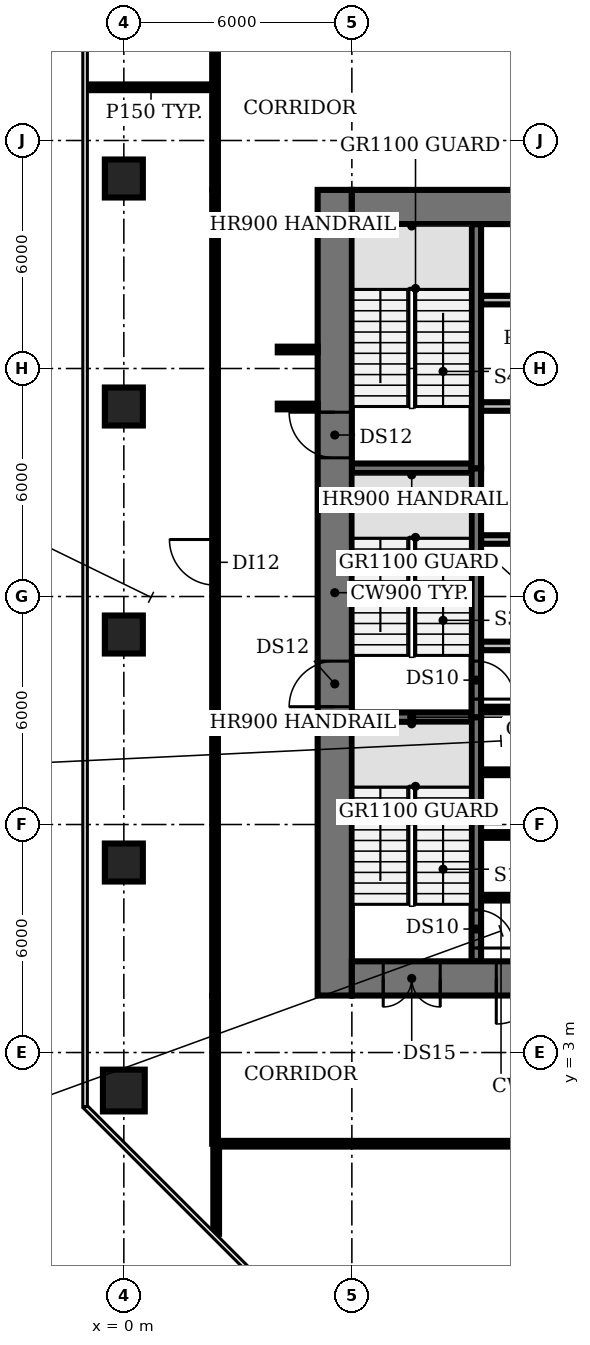
"""IFC4 building model, lengths in metres.
Left out: names, types, materials, properties, quantities, classifications, styles, units other than length and angle.
Written with IfcOpenShell. Run it as: python <this file> out.ifc"""

import sys

from ifc_helpers import new_model, si_unit, direction, frame, frame_2d, origin, origin_2d, place, context, subcontext, project, spatial, rectangle, circle, extrude, element, fill, save


model = new_model("IFC4")
c1 = context("Model", 3, precision=1e-05, world=origin(), true_north=direction((0.0, 1.0)))
c2 = subcontext(c1, "Body", "Model", "MODEL_VIEW")
j1 = project(units=[si_unit("LENGTHUNIT", "METRE"), si_unit("PLANEANGLEUNIT", "RADIAN")], contexts=[c1])
p1 = place(None, origin())
s1 = spatial("IfcSite", under=j1, at=p1, CompositionType="ELEMENT")
p2 = place(p1, origin())
s2 = spatial("IfcBuilding", under=s1, at=p2, CompositionType="ELEMENT")
p3 = place(p2, frame((0.0, 0.0, 24.5)))
s3 = spatial("IfcBuildingStorey", under=s2, at=p3, CompositionType="ELEMENT", Elevation=24.5)
p4 = place(p3, frame((0.0, 2.0, 0.0), z_axis=(0.0, 0.0, 1.0), x_axis=(1.0, 0.0, 0.0)))
e1 = element("IfcColumn", 1, at=p4, inside=s3, PredefinedType="COLUMN", context=c2, shape_type="SweptSolid", body=[
    extrude(circle(Radius=0.55, at=origin_2d()), origin(), (0.0, 0.0, 1.0), 4.15),
])
for number, where, z_axis, x_axis in (
    (2, (0.0, 8.0, 0.0), (0.0, 0.0, 1.0), (1.0, 0.0, 0.0)),
    (3, (0.0, 14.0, 0.0), (0.0, 0.0, 1.0), (1.0, 0.0, 0.0)),
    (4, (0.0, 20.0, 0.0), (0.0, 0.0, 1.0), (1.0, 0.0, 0.0)),
    (5, (0.0, 26.0, 0.0), (0.0, 0.0, 1.0), (1.0, 0.0, 0.0)),
):
    element("IfcColumn", number, at=place(p3, frame(where, z_axis=z_axis, x_axis=x_axis)), inside=s3, PredefinedType="COLUMN", context=c2, shape_type="SweptSolid", body=[
        extrude(rectangle(XDim=1.0, YDim=1.0, at=origin_2d()), origin(), (0.0, 0.0, 1.0), 4.15),
    ])
for number, where, z_axis, x_axis in (
    (6, (9.4, 7.075, 0.0), (0.0, 0.0, 1.0), (1.0, 0.0, 0.0)),
    (7, (9.4, 8.725, 0.0), (0.0, 0.0, 1.0), (1.0, 0.0, 0.0)),
    (8, (9.4, 10.375, 0.0), (0.0, 0.0, 1.0), (1.0, 0.0, 0.0)),
):
    element("IfcWall", number, at=place(p3, frame(where, z_axis=z_axis, x_axis=x_axis)), inside=s3, PredefinedType="SHEAR", context=c2, shape_type="SweptSolid", body=[
        extrude(rectangle(XDim=1.05, YDim=0.15, at=frame_2d((0.525, 0.0))), origin(), (0.0, 0.0, 1.0), 4.15),
    ])
p5 = place(p3, frame((6.0, 11.825, 0.0), z_axis=(0.0, 0.0, 1.0), x_axis=(1.0, 0.0, 0.0)))
e9 = element("IfcWall", 9, at=p5, inside=s3, PredefinedType="SHEAR", context=c2, shape_type="SweptSolid", body=[
    extrude(rectangle(XDim=3.15, YDim=0.25, at=frame_2d((1.575, 0.0))), origin(), (0.0, 0.0, 1.0), 4.15),
])
p6 = place(p3, frame((9.4, 12.025, 0.0), z_axis=(0.0, 0.0, 1.0), x_axis=(1.0, 0.0, 0.0)))
e10 = element("IfcWall", 10, at=p6, inside=s3, PredefinedType="SHEAR", context=c2, shape_type="SweptSolid", body=[
    extrude(rectangle(XDim=1.05, YDim=0.15, at=frame_2d((0.525, 0.0))), origin(), (0.0, 0.0, 1.0), 4.15),
])
p7 = place(p3, frame((9.4, 13.7, 0.0), z_axis=(0.0, 0.0, 1.0), x_axis=(1.0, 0.0, 0.0)))
e11 = element("IfcWall", 11, at=p7, inside=s3, PredefinedType="PARTITIONING", context=c2, shape_type="SweptSolid", body=[
    extrude(rectangle(XDim=4.0, YDim=0.225, at=frame_2d((2.0, 0.0))), origin(), (0.0, 0.0, 1.0), 4.15),
])
p8 = place(p3, frame((9.4, 16.5, 0.0), z_axis=(0.0, 0.0, 1.0), x_axis=(1.0, 0.0, 0.0)))
e12 = element("IfcWall", 12, at=p8, inside=s3, PredefinedType="PARTITIONING", context=c2, shape_type="SweptSolid", body=[
    extrude(rectangle(XDim=14.6, YDim=0.225, at=frame_2d((7.3, 0.0))), origin(), (0.0, 0.0, 1.0), 4.15),
])
p9 = place(p8, frame((0.75, 0.0, 0.0)))
e13 = element("IfcOpeningElement", 13, at=p9, cuts=e12, PredefinedType="OPENING", context=c2, shape_type="SweptSolid", body=[
    extrude(rectangle(XDim=1.1, YDim=2.1, at=frame_2d((0.55, 1.05))), frame((0.0, 0.123, 0.0), z_axis=(0.0, -1.0, 0.0), x_axis=(1.0, 0.0, 0.0)), (0.0, 0.0, 1.0), 0.245),
])
p10 = place(p8, frame((3.55, 0.0, 0.0)))
e14 = element("IfcOpeningElement", 14, at=p10, cuts=e12, PredefinedType="OPENING", context=c2, shape_type="SweptSolid", body=[
    extrude(rectangle(XDim=1.1, YDim=2.1, at=frame_2d((0.55, 1.05))), frame((0.0, 0.123, 0.0), z_axis=(0.0, -1.0, 0.0), x_axis=(1.0, 0.0, 0.0)), (0.0, 0.0, 1.0), 0.245),
])
p11 = place(p8, frame((6.35, 0.0, 0.0)))
e15 = element("IfcOpeningElement", 15, at=p11, cuts=e12, PredefinedType="OPENING", context=c2, shape_type="SweptSolid", body=[
    extrude(rectangle(XDim=1.1, YDim=2.1, at=frame_2d((0.55, 1.05))), frame((0.0, 0.123, 0.0), z_axis=(0.0, -1.0, 0.0), x_axis=(1.0, 0.0, 0.0)), (0.0, 0.0, 1.0), 0.245),
])
p12 = place(p8, frame((9.15, 0.0, 0.0)))
e16 = element("IfcOpeningElement", 16, at=p12, cuts=e12, PredefinedType="OPENING", context=c2, shape_type="SweptSolid", body=[
    extrude(rectangle(XDim=1.1, YDim=2.1, at=frame_2d((0.55, 1.05))), frame((0.0, 0.123, 0.0), z_axis=(0.0, -1.0, 0.0), x_axis=(1.0, 0.0, 0.0)), (0.0, 0.0, 1.0), 0.245),
])
p13 = place(p8, frame((11.647, 0.0, 0.0)))
e17 = element("IfcOpeningElement", 17, at=p13, cuts=e12, PredefinedType="OPENING", context=c2, shape_type="SweptSolid", body=[
    extrude(rectangle(XDim=0.9, YDim=2.1, at=frame_2d((0.45, 1.05))), frame((0.0, 0.123, 0.0), z_axis=(0.0, -1.0, 0.0), x_axis=(1.0, 0.0, 0.0)), (0.0, 0.0, 1.0), 0.245),
])
p14 = place(p8, frame((13.423, 0.0, 0.0)))
e18 = element("IfcOpeningElement", 18, at=p14, cuts=e12, PredefinedType="OPENING", context=c2, shape_type="SweptSolid", body=[
    extrude(rectangle(XDim=0.9, YDim=2.1, at=frame_2d((0.45, 1.05))), frame((0.0, 0.123, 0.0), z_axis=(0.0, -1.0, 0.0), x_axis=(1.0, 0.0, 0.0)), (0.0, 0.0, 1.0), 0.245),
])
p15 = place(p3, frame((6.0, 18.375, 0.0), z_axis=(0.0, 0.0, 1.0), x_axis=(1.0, 0.0, 0.0)))
e19 = element("IfcWall", 19, at=p15, inside=s3, PredefinedType="SHEAR", context=c2, shape_type="SweptSolid", body=[
    extrude(rectangle(XDim=3.15, YDim=0.25, at=frame_2d((1.575, 0.0))), origin(), (0.0, 0.0, 1.0), 4.15),
])
p16 = place(p3, frame((24.0, 20.0, 0.0), z_axis=(0.0, 0.0, 1.0), x_axis=(-1.0, 0.0, 0.0)))
e20 = element("IfcWall", 20, at=p16, inside=s3, PredefinedType="PARTITIONING", context=c2, shape_type="SweptSolid", body=[
    extrude(rectangle(XDim=14.6, YDim=0.225, at=frame_2d((7.3, 0.0))), origin(), (0.0, 0.0, 1.0), 4.15),
])
p17 = place(p16, frame((12.5, 0.0, 0.0)))
e21 = element("IfcOpeningElement", 21, at=p17, cuts=e20, PredefinedType="OPENING", context=c2, shape_type="SweptSolid", body=[
    extrude(rectangle(XDim=1.0, YDim=2.1, at=frame_2d((0.5, 1.05))), frame((0.0, 0.123, 0.0), z_axis=(0.0, -1.0, 0.0), x_axis=(1.0, 0.0, 0.0)), (0.0, 0.0, 1.0), 0.245),
])
p18 = place(p16, frame((8.825, 0.0, 0.0)))
e22 = element("IfcOpeningElement", 22, at=p18, cuts=e20, PredefinedType="OPENING", context=c2, shape_type="SweptSolid", body=[
    extrude(rectangle(XDim=1.0, YDim=2.1, at=frame_2d((0.5, 1.05))), frame((0.0, 0.123, 0.0), z_axis=(0.0, -1.0, 0.0), x_axis=(1.0, 0.0, 0.0)), (0.0, 0.0, 1.0), 0.245),
])
p19 = place(p16, frame((4.925, 0.0, 0.0)))
e23 = element("IfcOpeningElement", 23, at=p19, cuts=e20, PredefinedType="OPENING", context=c2, shape_type="SweptSolid", body=[
    extrude(rectangle(XDim=1.0, YDim=2.1, at=frame_2d((0.5, 1.05))), frame((0.0, 0.123, 0.0), z_axis=(0.0, -1.0, 0.0), x_axis=(1.0, 0.0, 0.0)), (0.0, 0.0, 1.0), 0.245),
])
p20 = place(p16, frame((2.137, 0.0, 0.0)))
e24 = element("IfcOpeningElement", 24, at=p20, cuts=e20, PredefinedType="OPENING", context=c2, shape_type="SweptSolid", body=[
    extrude(rectangle(XDim=0.9, YDim=2.1, at=frame_2d((0.45, 1.05))), frame((0.0, 0.123, 0.0), z_axis=(0.0, -1.0, 0.0), x_axis=(1.0, 0.0, 0.0)), (0.0, 0.0, 1.0), 0.245),
])
p21 = place(p16, frame((0.363, 0.0, 0.0)))
e25 = element("IfcOpeningElement", 25, at=p21, cuts=e20, PredefinedType="OPENING", context=c2, shape_type="SweptSolid", body=[
    extrude(rectangle(XDim=0.9, YDim=2.1, at=frame_2d((0.45, 1.05))), frame((0.0, 0.123, 0.0), z_axis=(0.0, -1.0, 0.0), x_axis=(1.0, 0.0, 0.0)), (0.0, 0.0, 1.0), 0.245),
])
p22 = place(p3, frame((9.4, 22.8, 0.0), z_axis=(0.0, 0.0, 1.0), x_axis=(1.0, 0.0, 0.0)))
e26 = element("IfcWall", 26, at=p22, inside=s3, PredefinedType="PARTITIONING", context=c2, shape_type="SweptSolid", body=[
    extrude(rectangle(XDim=14.6, YDim=0.225, at=frame_2d((7.3, 0.0))), origin(), (0.0, 0.0, 1.0), 4.15),
])
p23 = place(p3, frame((9.275, 11.825, 0.0), z_axis=(0.0, 0.0, 1.0), x_axis=(0.0, -1.0, 0.0)))
e27 = element("IfcWall", 27, at=p23, inside=s3, PredefinedType="SHEAR", context=c2, shape_type="SweptSolid", body=[
    extrude(rectangle(XDim=6.425, YDim=0.25, at=frame_2d((3.212, 0.0))), origin(), (0.0, 0.0, 1.0), 4.15),
])
p24 = place(p23, frame((5.075, 0.0, 0.0)))
e28 = element("IfcOpeningElement", 28, at=p24, cuts=e27, PredefinedType="OPENING", context=c2, shape_type="SweptSolid", body=[
    extrude(rectangle(XDim=1.0, YDim=2.1, at=frame_2d((0.5, 1.05))), frame((0.0, 0.135, 0.0), z_axis=(0.0, -1.0, 0.0), x_axis=(1.0, 0.0, 0.0)), (0.0, 0.0, 1.0), 0.27),
])
p25 = place(p3, frame((9.275, 18.375, 0.0), z_axis=(0.0, 0.0, 1.0), x_axis=(0.0, -1.0, 0.0)))
e29 = element("IfcWall", 29, at=p25, inside=s3, PredefinedType="SHEAR", context=c2, shape_type="SweptSolid", body=[
    extrude(rectangle(XDim=6.55, YDim=0.25, at=frame_2d((3.275, 0.0))), origin(), (0.0, 0.0, 1.0), 4.15),
])
p26 = place(p25, frame((5.075, 0.0, 0.0)))
e30 = element("IfcOpeningElement", 30, at=p26, cuts=e29, PredefinedType="OPENING", context=c2, shape_type="SweptSolid", body=[
    extrude(rectangle(XDim=1.0, YDim=2.1, at=frame_2d((0.5, 1.05))), frame((0.0, 0.135, 0.0), z_axis=(0.0, -1.0, 0.0), x_axis=(1.0, 0.0, 0.0)), (0.0, 0.0, 1.0), 0.27),
])
p27 = place(p3, frame((9.275, 18.375, 0.0), z_axis=(0.0, 0.0, 1.0), x_axis=(0.0, 1.0, 0.0)))
e31 = element("IfcWall", 31, at=p27, inside=s3, PredefinedType="SHEAR", context=c2, shape_type="SweptSolid", body=[
    extrude(rectangle(XDim=6.425, YDim=0.25, at=frame_2d((3.212, 0.0))), origin(), (0.0, 0.0, 1.0), 4.15),
])
p28 = place(p3, frame((5.55, 4.5, 0.0), z_axis=(0.0, 0.0, 1.0), x_axis=(0.0, 1.0, 0.0)))
e32 = element("IfcWall", 32, at=p28, inside=s3, PredefinedType="SHEAR", context=c2, shape_type="SweptSolid", body=[
    extrude(rectangle(XDim=21.2, YDim=0.9, at=frame_2d((10.6, 0.0))), origin(), (0.0, 0.0, 1.0), 4.15),
])
p29 = place(p28, frame((7.6, 0.0, 0.0)))
e33 = element("IfcOpeningElement", 33, at=p29, cuts=e32, PredefinedType="OPENING", context=c2, shape_type="SweptSolid", body=[
    extrude(rectangle(XDim=1.2, YDim=2.1, at=frame_2d((0.6, 1.05))), frame((0.0, 0.46, 0.0), z_axis=(0.0, -1.0, 0.0), x_axis=(1.0, 0.0, 0.0)), (0.0, 0.0, 1.0), 0.92),
])
p30 = place(p28, frame((14.15, 0.0, 0.0)))
e34 = element("IfcOpeningElement", 34, at=p30, cuts=e32, PredefinedType="OPENING", context=c2, shape_type="SweptSolid", body=[
    extrude(rectangle(XDim=1.2, YDim=2.1, at=frame_2d((0.6, 1.05))), frame((0.0, 0.46, 0.0), z_axis=(0.0, -1.0, 0.0), x_axis=(1.0, 0.0, 0.0)), (0.0, 0.0, 1.0), 0.92),
])
p31 = place(p3, frame((24.0, 4.95, 0.0), z_axis=(0.0, 0.0, 1.0), x_axis=(-1.0, 0.0, 0.0)))
e35 = element("IfcWall", 35, at=p31, inside=s3, PredefinedType="SHEAR", context=c2, shape_type="SweptSolid", body=[
    extrude(rectangle(XDim=18.0, YDim=0.9, at=frame_2d((9.0, 0.0))), origin(), (0.0, 0.0, 1.0), 4.15),
])
p32 = place(p31, frame((15.675, 0.0, 0.0)))
e36 = element("IfcOpeningElement", 36, at=p32, cuts=e35, PredefinedType="OPENING", context=c2, shape_type="SweptSolid", body=[
    extrude(rectangle(XDim=1.5, YDim=2.1, at=frame_2d((0.75, 1.05))), frame((0.0, 0.46, 0.0), z_axis=(0.0, -1.0, 0.0), x_axis=(1.0, 0.0, 0.0)), (0.0, 0.0, 1.0), 0.92),
])
p33 = place(p31, frame((0.825, 0.0, 0.0)))
e37 = element("IfcOpeningElement", 37, at=p33, cuts=e35, PredefinedType="OPENING", context=c2, shape_type="SweptSolid", body=[
    extrude(rectangle(XDim=1.5, YDim=2.1, at=frame_2d((0.75, 1.05))), frame((0.0, 0.46, 0.0), z_axis=(0.0, -1.0, 0.0), x_axis=(1.0, 0.0, 0.0)), (0.0, 0.0, 1.0), 0.92),
])
p34 = place(p31, frame((13.0, 0.0, 0.0)))
e38 = element("IfcOpeningElement", 38, at=p34, cuts=e35, PredefinedType="OPENING", context=c2, shape_type="SweptSolid", body=[
    extrude(rectangle(XDim=1.2, YDim=2.1, at=frame_2d((0.6, 1.05))), frame((0.0, 0.46, 0.0), z_axis=(0.0, -1.0, 0.0), x_axis=(1.0, 0.0, 0.0)), (0.0, 0.0, 1.0), 0.92),
])
p35 = place(p31, frame((4.9, 0.0, 0.0)))
e39 = element("IfcOpeningElement", 39, at=p35, cuts=e35, PredefinedType="OPENING", context=c2, shape_type="SweptSolid", body=[
    extrude(rectangle(XDim=1.0, YDim=2.1, at=frame_2d((0.5, 1.05))), frame((0.0, 0.46, 0.0), z_axis=(0.0, -1.0, 0.0), x_axis=(1.0, 0.0, 0.0)), (0.0, 0.0, 1.0), 0.92),
])
p36 = place(p3, frame((6.0, 25.25, 0.0), z_axis=(0.0, 0.0, 1.0), x_axis=(1.0, 0.0, 0.0)))
e40 = element("IfcWall", 40, at=p36, inside=s3, PredefinedType="SHEAR", context=c2, shape_type="SweptSolid", body=[
    extrude(rectangle(XDim=18.0, YDim=0.9, at=frame_2d((9.0, 0.0))), origin(), (0.0, 0.0, 1.0), 4.15),
])
p37 = place(p3, frame((-0.97, 28.4, 0.0), z_axis=(0.0, 0.0, 1.0), x_axis=(1.0, 0.0, 0.0)))
e41 = element("IfcWall", 41, at=p37, inside=s3, PredefinedType="PARTITIONING", context=c2, shape_type="SweptSolid", body=[
    extrude(rectangle(XDim=3.37, YDim=0.15, at=frame_2d((1.685, 0.0))), origin(), (0.0, 0.0, 1.0), 3.08),
])
p38 = place(p3, frame((2.4, 0.6, 0.0), z_axis=(0.0, 0.0, 1.0), x_axis=(0.0, 1.0, 0.0)))
e42 = element("IfcWall", 42, at=p38, inside=s3, PredefinedType="PARTITIONING", context=c2, shape_type="SweptSolid", body=[
    extrude(rectangle(XDim=3.9, YDim=0.15, at=frame_2d((1.95, 0.0))), origin(), (0.0, 0.0, 1.0), 3.08),
])
p39 = place(p3, frame((2.4, 4.5, 0.0), z_axis=(0.0, 0.0, 1.0), x_axis=(0.0, 1.0, 0.0)))
e43 = element("IfcWall", 43, at=p39, inside=s3, PredefinedType="PARTITIONING", context=c2, shape_type="SweptSolid", body=[
    extrude(rectangle(XDim=21.2, YDim=0.15, at=frame_2d((10.6, 0.0))), origin(), (0.0, 0.0, 1.0), 3.08),
])
p40 = place(p39, frame((10.8, 0.0, 0.0)))
e44 = element("IfcOpeningElement", 44, at=p40, cuts=e43, PredefinedType="OPENING", context=c2, shape_type="SweptSolid", body=[
    extrude(rectangle(XDim=1.2, YDim=2.1, at=frame_2d((0.6, 1.05))), frame((0.0, 0.085, 0.0), z_axis=(0.0, -1.0, 0.0), x_axis=(1.0, 0.0, 0.0)), (0.0, 0.0, 1.0), 0.17),
])
p41 = place(p3, frame((2.4, 25.7, 0.0), z_axis=(0.0, 0.0, 1.0), x_axis=(0.0, 1.0, 0.0)))
e45 = element("IfcWall", 45, at=p41, inside=s3, PredefinedType="PARTITIONING", context=c2, shape_type="SweptSolid", body=[
    extrude(rectangle(XDim=3.9, YDim=0.15, at=frame_2d((1.95, 0.0))), origin(), (0.0, 0.0, 1.0), 3.08),
])
p42 = place(p3, frame((2.43, -1.77, 0.0), z_axis=(0.0, 0.0, 1.0), x_axis=(0.0, 1.0, 0.0)))
e46 = element("IfcWall", 46, at=p42, inside=s3, PredefinedType="PARTITIONING", context=c2, shape_type="SweptSolid", body=[
    extrude(rectangle(XDim=2.37, YDim=0.15, at=frame_2d((1.185, 0.0))), origin(), (0.0, 0.0, 1.0), 3.08),
])
for number, where, z_axis, x_axis in (
    (47, (4.05, 20.0, 0.0), (0.0, 0.0, 1.0), (1.0, 0.0, 0.0)),
    (48, (4.05, 21.5, 0.0), (0.0, 0.0, 1.0), (1.0, 0.0, 0.0)),
):
    element("IfcWall", number, at=place(p3, frame(where, z_axis=z_axis, x_axis=x_axis)), inside=s3, PredefinedType="PARTITIONING", context=c2, shape_type="SweptSolid", body=[
        extrude(rectangle(XDim=1.05, YDim=0.15, at=frame_2d((0.525, 0.0))), origin(), (0.0, 0.0, 1.0), 3.08),
    ])
p43 = place(p3, frame((27.6, 0.6, 0.0), z_axis=(0.0, 0.0, 1.0), x_axis=(-1.0, 0.0, 0.0)))
e49 = element("IfcWall", 49, at=p43, inside=s3, PredefinedType="PARTITIONING", context=c2, shape_type="SweptSolid", body=[
    extrude(rectangle(XDim=25.2, YDim=0.15, at=frame_2d((12.6, 0.0))), origin(), (0.0, 0.0, 1.0), 3.08),
])
p44 = place(p43, frame((12.1, 0.0, 0.0)))
e50 = element("IfcOpeningElement", 50, at=p44, cuts=e49, PredefinedType="OPENING", context=c2, shape_type="SweptSolid", body=[
    extrude(rectangle(XDim=1.2, YDim=2.1, at=frame_2d((0.6, 1.05))), frame((0.0, 0.085, 0.0), z_axis=(0.0, -1.0, 0.0), x_axis=(1.0, 0.0, 0.0)), (0.0, 0.0, 1.0), 0.17),
])
p45 = place(p24, origin())
e51 = element("IfcDoor", 51, at=p45, inside=s3, OperationType="SINGLE_SWING_RIGHT", PredefinedType="DOOR", context=c2, shape_type="SweptSolid", body=[
    extrude(rectangle(XDim=1.0, YDim=2.1, at=frame_2d((0.5, 1.05))), frame((0.0, 0.025, 0.0), z_axis=(0.0, -1.0, 0.0), x_axis=(1.0, 0.0, 0.0)), (0.0, 0.0, 1.0), 0.05),
])
fill(e28, e51)
p46 = place(p26, origin())
e52 = element("IfcDoor", 52, at=p46, inside=s3, OperationType="SINGLE_SWING_RIGHT", PredefinedType="DOOR", context=c2, shape_type="SweptSolid", body=[
    extrude(rectangle(XDim=1.0, YDim=2.1, at=frame_2d((0.5, 1.05))), frame((0.0, 0.025, 0.0), z_axis=(0.0, -1.0, 0.0), x_axis=(1.0, 0.0, 0.0)), (0.0, 0.0, 1.0), 0.05),
])
fill(e30, e52)
p47 = place(p29, origin())
e53 = element("IfcDoor", 53, at=p47, inside=s3, OperationType="SINGLE_SWING_LEFT", PredefinedType="DOOR", context=c2, shape_type="SweptSolid", body=[
    extrude(rectangle(XDim=1.2, YDim=2.1, at=frame_2d((0.6, 1.05))), frame((0.0, 0.025, 0.0), z_axis=(0.0, -1.0, 0.0), x_axis=(1.0, 0.0, 0.0)), (0.0, 0.0, 1.0), 0.05),
])
fill(e33, e53)
p48 = place(p30, origin())
e54 = element("IfcDoor", 54, at=p48, inside=s3, OperationType="SINGLE_SWING_RIGHT", PredefinedType="DOOR", context=c2, shape_type="SweptSolid", body=[
    extrude(rectangle(XDim=1.2, YDim=2.1, at=frame_2d((0.6, 1.05))), frame((0.0, 0.025, 0.0), z_axis=(0.0, -1.0, 0.0), x_axis=(1.0, 0.0, 0.0)), (0.0, 0.0, 1.0), 0.05),
])
fill(e34, e54)
p49 = place(p32, origin())
e55 = element("IfcDoor", 55, at=p49, inside=s3, OperationType="DOUBLE_DOOR_SINGLE_SWING", PredefinedType="DOOR", context=c2, shape_type="SweptSolid", body=[
    extrude(rectangle(XDim=1.5, YDim=2.1, at=frame_2d((0.75, 1.05))), frame((0.0, 0.025, 0.0), z_axis=(0.0, -1.0, 0.0), x_axis=(1.0, 0.0, 0.0)), (0.0, 0.0, 1.0), 0.05),
])
fill(e36, e55)
p50 = place(p34, origin())
e56 = element("IfcDoor", 56, at=p50, inside=s3, OperationType="SINGLE_SWING_RIGHT", PredefinedType="DOOR", context=c2, shape_type="SweptSolid", body=[
    extrude(rectangle(XDim=1.2, YDim=2.1, at=frame_2d((0.6, 1.05))), frame((0.0, 0.025, 0.0), z_axis=(0.0, -1.0, 0.0), x_axis=(1.0, 0.0, 0.0)), (0.0, 0.0, 1.0), 0.05),
])
fill(e38, e56)
p51 = place(p40, origin())
e57 = element("IfcDoor", 57, at=p51, inside=s3, OperationType="SINGLE_SWING_RIGHT", PredefinedType="DOOR", context=c2, shape_type="SweptSolid", body=[
    extrude(rectangle(XDim=1.2, YDim=2.1, at=frame_2d((0.6, 1.05))), frame((0.0, 0.025, 0.0), z_axis=(0.0, -1.0, 0.0), x_axis=(1.0, 0.0, 0.0)), (0.0, 0.0, 1.0), 0.05),
])
fill(e44, e57)
save(model, sys.argv[1])
